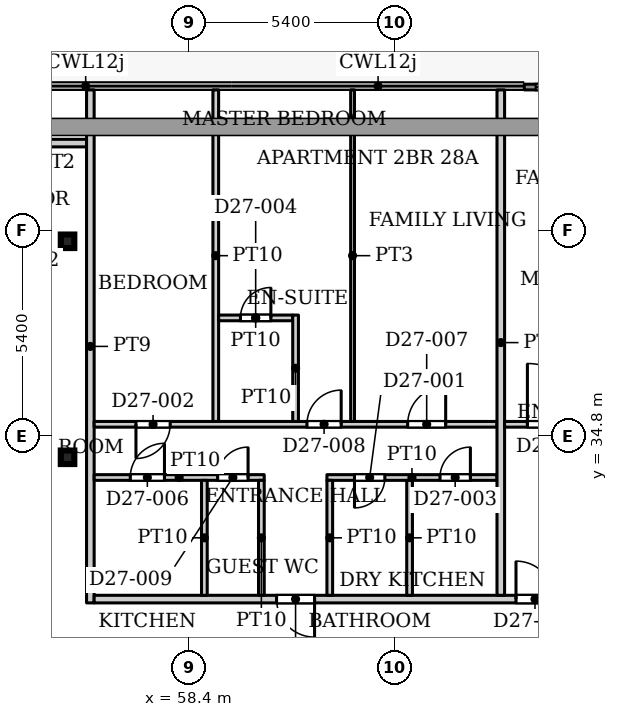
"""IFC4 building model, lengths in metres.
Left out: names, types, materials, properties, quantities, classifications, styles, units other than length and angle.
Written with IfcOpenShell. Run it as: python <this file> out.ifc"""

import sys

from ifc_helpers import new_model, si_unit, direction, frame, frame_2d, origin, origin_2d, place, context, subcontext, project, spatial, rectangle, hollow_rectangle, extrude, source, transform, mapped, element, fill, save


model = new_model("IFC4")
c1 = context("Model", 3, precision=1e-05, world=origin(), true_north=direction((0.0, 1.0)))
c2 = subcontext(c1, "Body", "Model", "MODEL_VIEW")
j1 = project(units=[si_unit("LENGTHUNIT", "METRE"), si_unit("PLANEANGLEUNIT", "RADIAN")], contexts=[c1])
p1 = place(None, origin())
s1 = spatial("IfcSite", under=j1, at=p1, CompositionType="ELEMENT")
p2 = place(p1, origin())
s2 = spatial("IfcBuilding", under=s1, at=p2, CompositionType="ELEMENT")
p3 = place(p2, frame((0.0, 0.0, 121.4)))
s3 = spatial("IfcBuildingStorey", under=s2, at=p3, CompositionType="ELEMENT", Elevation=121.4)
for number, where, z_axis, x_axis in (
    (1, (55.2, 34.232, 0.0), (0.0, 0.0, 1.0), (1.0, 0.0, 0.0)),
    (2, (55.2, 39.916, 0.0), (0.0, 0.0, 1.0), (1.0, 0.0, 0.0)),
):
    element("IfcColumn", number, at=place(p3, frame(where, z_axis=z_axis, x_axis=x_axis)), inside=s3, PredefinedType="COLUMN", context=c2, shape_type="SweptSolid", body=[
        extrude(hollow_rectangle(XDim=0.356, YDim=0.356, WallThickness=0.016, InnerFilletRadius=0.016, OuterFilletRadius=0.032, at=origin_2d()), origin(), (0.0, 0.0, 1.0), 3.9),
    ])
p4 = place(p3, frame((67.218, 43.975, 0.0), z_axis=(0.0, 0.0, 1.0), x_axis=(1.0, 0.0, 0.0)))
e3 = element("IfcWall", 3, at=p4, inside=s3, PredefinedType="SOLIDWALL", context=c2, shape_type="SweptSolid", body=[
    extrude(rectangle(XDim=2.4, YDim=0.15, at=frame_2d((1.2, 0.0))), origin(), (0.0, 0.0, 1.0), 3.75),
])
p5 = place(p4, frame((0.3, 0.0, 0.0)))
e4 = element("IfcOpeningElement", 4, at=p5, cuts=e3, PredefinedType="OPENING", context=c2, shape_type="SweptSolid", body=[
    extrude(rectangle(XDim=1.8, YDim=2.4, at=frame_2d((0.9, 1.2))), frame((0.0, 0.085, 0.0), z_axis=(0.0, -1.0, 0.0), x_axis=(1.0, 0.0, 0.0)), (0.0, 0.0, 1.0), 0.17),
])
p6 = place(p3, frame((53.5, 42.5, 0.0), z_axis=(0.0, 0.0, 1.0), x_axis=(1.0, 0.0, 0.0)))
e5 = element("IfcWall", 5, at=p6, inside=s3, PredefinedType="PARTITIONING", context=c2, shape_type="SweptSolid", body=[
    extrude(rectangle(XDim=2.2, YDim=0.2, at=frame_2d((1.1, 0.0))), origin(), (0.0, 0.0, 1.0), 3.6),
])
p7 = place(p3, frame((55.8, 30.4, 0.0), z_axis=(0.0, 0.0, 1.0), x_axis=(0.0, 1.0, 0.0)))
e6 = element("IfcWall", 6, at=p7, inside=s3, PredefinedType="PARTITIONING", context=c2, shape_type="SweptSolid", body=[
    extrude(rectangle(XDim=13.5, YDim=0.2, at=frame_2d((6.75, 0.0))), origin(), (0.0, 0.0, 1.0), 3.6),
])
p8 = place(p3, frame((55.9, 30.5, 0.0), z_axis=(0.0, 0.0, 1.0), x_axis=(1.0, 0.0, 0.0)))
e7 = element("IfcWall", 7, at=p8, inside=s3, PredefinedType="PARTITIONING", context=c2, shape_type="SweptSolid", body=[
    extrude(rectangle(XDim=42.2, YDim=0.2, at=frame_2d((21.1, 0.0))), origin(), (0.0, 0.0, 1.0), 3.6),
])
p9 = place(p8, frame((4.8, 0.0, 0.0)))
e8 = element("IfcOpeningElement", 8, at=p9, cuts=e7, PredefinedType="OPENING", context=c2, shape_type="SweptSolid", body=[
    extrude(rectangle(XDim=1.0, YDim=2.1, at=frame_2d((0.5, 1.05))), frame((0.0, 0.11, 0.0), z_axis=(0.0, -1.0, 0.0), x_axis=(1.0, 0.0, 0.0)), (0.0, 0.0, 1.0), 0.22),
])
p10 = place(p8, frame((11.1, 0.0, 0.0)))
e9 = element("IfcOpeningElement", 9, at=p10, cuts=e7, PredefinedType="OPENING", context=c2, shape_type="SweptSolid", body=[
    extrude(rectangle(XDim=1.0, YDim=2.1, at=frame_2d((0.5, 1.05))), frame((0.0, 0.11, 0.0), z_axis=(0.0, -1.0, 0.0), x_axis=(1.0, 0.0, 0.0)), (0.0, 0.0, 1.0), 0.22),
])
p11 = place(p8, frame((39.0, 0.0, 0.0)))
e10 = element("IfcOpeningElement", 10, at=p11, cuts=e7, PredefinedType="OPENING", context=c2, shape_type="SweptSolid", body=[
    extrude(rectangle(XDim=1.0, YDim=2.1, at=frame_2d((0.5, 1.05))), frame((0.0, 0.11, 0.0), z_axis=(0.0, -1.0, 0.0), x_axis=(1.0, 0.0, 0.0)), (0.0, 0.0, 1.0), 0.22),
])
p12 = place(p3, frame((55.9, 33.7, 0.0), z_axis=(0.0, 0.0, 1.0), x_axis=(1.0, 0.0, 0.0)))
e11 = element("IfcWall", 11, at=p12, inside=s3, PredefinedType="PARTITIONING", context=c2, shape_type="SweptSolid", body=[
    extrude(rectangle(XDim=4.475, YDim=0.15, at=frame_2d((2.238, 0.0))), origin(), (0.0, 0.0, 1.0), 3.6),
])
p13 = place(p12, frame((0.95, 0.0, 0.0)))
e12 = element("IfcOpeningElement", 12, at=p13, cuts=e11, PredefinedType="OPENING", context=c2, shape_type="SweptSolid", body=[
    extrude(rectangle(XDim=0.9, YDim=2.1, at=frame_2d((0.45, 1.05))), frame((0.0, 0.085, 0.0), z_axis=(0.0, -1.0, 0.0), x_axis=(1.0, 0.0, 0.0)), (0.0, 0.0, 1.0), 0.17),
])
p14 = place(p12, frame((3.25, 0.0, 0.0)))
e13 = element("IfcOpeningElement", 13, at=p14, cuts=e11, PredefinedType="OPENING", context=c2, shape_type="SweptSolid", body=[
    extrude(rectangle(XDim=0.8, YDim=2.1, at=frame_2d((0.4, 1.05))), frame((0.0, 0.085, 0.0), z_axis=(0.0, -1.0, 0.0), x_axis=(1.0, 0.0, 0.0)), (0.0, 0.0, 1.0), 0.17),
])
p15 = place(p3, frame((55.9, 35.1, 0.0), z_axis=(0.0, 0.0, 1.0), x_axis=(1.0, 0.0, 0.0)))
e14 = element("IfcWall", 14, at=p15, inside=s3, PredefinedType="PARTITIONING", context=c2, shape_type="SweptSolid", body=[
    extrude(rectangle(XDim=10.6, YDim=0.15, at=frame_2d((5.3, 0.0))), origin(), (0.0, 0.0, 1.0), 3.6),
])
p16 = place(p15, frame((1.1, 0.0, 0.0)))
e15 = element("IfcOpeningElement", 15, at=p16, cuts=e14, PredefinedType="OPENING", context=c2, shape_type="SweptSolid", body=[
    extrude(rectangle(XDim=0.9, YDim=2.1, at=frame_2d((0.45, 1.05))), frame((0.0, 0.085, 0.0), z_axis=(0.0, -1.0, 0.0), x_axis=(1.0, 0.0, 0.0)), (0.0, 0.0, 1.0), 0.17),
])
p17 = place(p15, frame((8.25, 0.0, 0.0)))
e16 = element("IfcOpeningElement", 16, at=p17, cuts=e14, PredefinedType="OPENING", context=c2, shape_type="SweptSolid", body=[
    extrude(rectangle(XDim=1.0, YDim=2.1, at=frame_2d((0.5, 1.05))), frame((0.0, 0.085, 0.0), z_axis=(0.0, -1.0, 0.0), x_axis=(1.0, 0.0, 0.0)), (0.0, 0.0, 1.0), 0.17),
])
p18 = place(p15, frame((5.6, 0.0, 0.0)))
e17 = element("IfcOpeningElement", 17, at=p18, cuts=e14, PredefinedType="OPENING", context=c2, shape_type="SweptSolid", body=[
    extrude(rectangle(XDim=0.9, YDim=2.1, at=frame_2d((0.45, 1.05))), frame((0.0, 0.085, 0.0), z_axis=(0.0, -1.0, 0.0), x_axis=(1.0, 0.0, 0.0)), (0.0, 0.0, 1.0), 0.17),
])
p19 = place(p3, frame((58.8, 30.6, 0.0), z_axis=(0.0, 0.0, 1.0), x_axis=(0.0, 1.0, 0.0)))
e18 = element("IfcWall", 18, at=p19, inside=s3, PredefinedType="PARTITIONING", context=c2, shape_type="SweptSolid", body=[
    extrude(rectangle(XDim=3.025, YDim=0.15, at=frame_2d((1.512, 0.0))), origin(), (0.0, 0.0, 1.0), 3.6),
])
p20 = place(p3, frame((59.1, 35.175, 0.0), z_axis=(0.0, 0.0, 1.0), x_axis=(0.0, 1.0, 0.0)))
e19 = element("IfcWall", 19, at=p20, inside=s3, PredefinedType="PARTITIONING", context=c2, shape_type="SweptSolid", body=[
    extrude(rectangle(XDim=8.725, YDim=0.15, at=frame_2d((4.362, 0.0))), origin(), (0.0, 0.0, 1.0), 3.6),
])
p21 = place(p3, frame((59.175, 37.9, 0.0), z_axis=(0.0, 0.0, 1.0), x_axis=(1.0, 0.0, 0.0)))
e20 = element("IfcWall", 20, at=p21, inside=s3, PredefinedType="PARTITIONING", context=c2, shape_type="SweptSolid", body=[
    extrude(rectangle(XDim=1.95, YDim=0.15, at=frame_2d((0.975, 0.0))), origin(), (0.0, 0.0, 1.0), 3.6),
])
p22 = place(p21, frame((0.575, 0.0, 0.0)))
e21 = element("IfcOpeningElement", 21, at=p22, cuts=e20, PredefinedType="OPENING", context=c2, shape_type="SweptSolid", body=[
    extrude(rectangle(XDim=0.8, YDim=2.1, at=frame_2d((0.4, 1.05))), frame((0.0, 0.085, 0.0), z_axis=(0.0, -1.0, 0.0), x_axis=(1.0, 0.0, 0.0)), (0.0, 0.0, 1.0), 0.17),
])
p23 = place(p3, frame((60.3, 30.6, 0.0), z_axis=(0.0, 0.0, 1.0), x_axis=(0.0, 1.0, 0.0)))
e22 = element("IfcWall", 22, at=p23, inside=s3, PredefinedType="PARTITIONING", context=c2, shape_type="SweptSolid", body=[
    extrude(rectangle(XDim=3.025, YDim=0.15, at=frame_2d((1.512, 0.0))), origin(), (0.0, 0.0, 1.0), 3.6),
])
p24 = place(p3, frame((61.2, 35.175, 0.0), z_axis=(0.0, 0.0, 1.0), x_axis=(0.0, 1.0, 0.0)))
e23 = element("IfcWall", 23, at=p24, inside=s3, PredefinedType="PARTITIONING", context=c2, shape_type="SweptSolid", body=[
    extrude(rectangle(XDim=2.8, YDim=0.15, at=frame_2d((1.4, 0.0))), origin(), (0.0, 0.0, 1.0), 3.6),
])
p25 = place(p3, frame((62.025, 33.7, 0.0), z_axis=(0.0, 0.0, 1.0), x_axis=(1.0, 0.0, 0.0)))
e24 = element("IfcWall", 24, at=p25, inside=s3, PredefinedType="PARTITIONING", context=c2, shape_type="SweptSolid", body=[
    extrude(rectangle(XDim=4.475, YDim=0.15, at=frame_2d((2.238, 0.0))), origin(), (0.0, 0.0, 1.0), 3.6),
])
p26 = place(p25, frame((0.725, 0.0, 0.0)))
e25 = element("IfcOpeningElement", 25, at=p26, cuts=e24, PredefinedType="OPENING", context=c2, shape_type="SweptSolid", body=[
    extrude(rectangle(XDim=0.8, YDim=2.1, at=frame_2d((0.4, 1.05))), frame((0.0, 0.085, 0.0), z_axis=(0.0, -1.0, 0.0), x_axis=(1.0, 0.0, 0.0)), (0.0, 0.0, 1.0), 0.17),
])
p27 = place(p25, frame((2.975, 0.0, 0.0)))
e26 = element("IfcOpeningElement", 26, at=p27, cuts=e24, PredefinedType="OPENING", context=c2, shape_type="SweptSolid", body=[
    extrude(rectangle(XDim=0.8, YDim=2.1, at=frame_2d((0.4, 1.05))), frame((0.0, 0.085, 0.0), z_axis=(0.0, -1.0, 0.0), x_axis=(1.0, 0.0, 0.0)), (0.0, 0.0, 1.0), 0.17),
])
p28 = place(p3, frame((62.1, 30.6, 0.0), z_axis=(0.0, 0.0, 1.0), x_axis=(0.0, 1.0, 0.0)))
e27 = element("IfcWall", 27, at=p28, inside=s3, PredefinedType="PARTITIONING", context=c2, shape_type="SweptSolid", body=[
    extrude(rectangle(XDim=3.025, YDim=0.15, at=frame_2d((1.512, 0.0))), origin(), (0.0, 0.0, 1.0), 3.6),
])
p29 = place(p3, frame((62.7, 35.175, 0.0), z_axis=(0.0, 0.0, 1.0), x_axis=(0.0, 1.0, 0.0)))
e28 = element("IfcWall", 28, at=p29, inside=s3, PredefinedType="PARTITIONING", context=c2, shape_type="SweptSolid", body=[
    extrude(rectangle(XDim=8.725, YDim=0.1, at=frame_2d((4.362, 0.0))), origin(), (0.0, 0.0, 1.0), 3.6),
])
p30 = place(p3, frame((64.2, 30.6, 0.0), z_axis=(0.0, 0.0, 1.0), x_axis=(0.0, 1.0, 0.0)))
e29 = element("IfcWall", 29, at=p30, inside=s3, PredefinedType="PARTITIONING", context=c2, shape_type="SweptSolid", body=[
    extrude(rectangle(XDim=3.025, YDim=0.15, at=frame_2d((1.512, 0.0))), origin(), (0.0, 0.0, 1.0), 3.6),
])
p31 = place(p3, frame((66.6, 30.6, 0.0), z_axis=(0.0, 0.0, 1.0), x_axis=(0.0, 1.0, 0.0)))
e30 = element("IfcWall", 30, at=p31, inside=s3, PredefinedType="PARTITIONING", context=c2, shape_type="SweptSolid", body=[
    extrude(rectangle(XDim=13.3, YDim=0.2, at=frame_2d((6.65, 0.0))), origin(), (0.0, 0.0, 1.0), 3.6),
])
p32 = place(p3, frame((66.7, 35.1, 0.0), z_axis=(0.0, 0.0, 1.0), x_axis=(1.0, 0.0, 0.0)))
e31 = element("IfcWall", 31, at=p32, inside=s3, PredefinedType="PARTITIONING", context=c2, shape_type="SweptSolid", body=[
    extrude(rectangle(XDim=14.8, YDim=0.15, at=frame_2d((7.4, 0.0))), origin(), (0.0, 0.0, 1.0), 3.6),
])
p33 = place(p32, frame((10.25, 0.0, 0.0)))
e32 = element("IfcOpeningElement", 32, at=p33, cuts=e31, PredefinedType="OPENING", context=c2, shape_type="SweptSolid", body=[
    extrude(rectangle(XDim=0.9, YDim=2.1, at=frame_2d((0.45, 1.05))), frame((0.0, 0.085, 0.0), z_axis=(0.0, -1.0, 0.0), x_axis=(1.0, 0.0, 0.0)), (0.0, 0.0, 1.0), 0.17),
])
p34 = place(p32, frame((12.95, 0.0, 0.0)))
e33 = element("IfcOpeningElement", 33, at=p34, cuts=e31, PredefinedType="OPENING", context=c2, shape_type="SweptSolid", body=[
    extrude(rectangle(XDim=0.9, YDim=2.1, at=frame_2d((0.45, 1.05))), frame((0.0, 0.085, 0.0), z_axis=(0.0, -1.0, 0.0), x_axis=(1.0, 0.0, 0.0)), (0.0, 0.0, 1.0), 0.17),
])
p35 = place(p32, frame((3.9, 0.0, 0.0)))
e34 = element("IfcOpeningElement", 34, at=p35, cuts=e31, PredefinedType="OPENING", context=c2, shape_type="SweptSolid", body=[
    extrude(rectangle(XDim=1.0, YDim=2.1, at=frame_2d((0.5, 1.05))), frame((0.0, 0.085, 0.0), z_axis=(0.0, -1.0, 0.0), x_axis=(1.0, 0.0, 0.0)), (0.0, 0.0, 1.0), 0.17),
])
p36 = place(p32, frame((0.6, 0.0, 0.0)))
e35 = element("IfcOpeningElement", 35, at=p36, cuts=e31, PredefinedType="OPENING", context=c2, shape_type="SweptSolid", body=[
    extrude(rectangle(XDim=1.6, YDim=2.1, at=frame_2d((0.8, 1.05))), frame((0.0, 0.085, 0.0), z_axis=(0.0, -1.0, 0.0), x_axis=(1.0, 0.0, 0.0)), (0.0, 0.0, 1.0), 0.17),
])
p37 = place(p32, frame((8.3, 0.0, 0.0)))
e36 = element("IfcOpeningElement", 36, at=p37, cuts=e31, PredefinedType="OPENING", context=c2, shape_type="SweptSolid", body=[
    extrude(rectangle(XDim=0.9, YDim=2.1, at=frame_2d((0.45, 1.05))), frame((0.0, 0.085, 0.0), z_axis=(0.0, -1.0, 0.0), x_axis=(1.0, 0.0, 0.0)), (0.0, 0.0, 1.0), 0.17),
])
m1 = source(origin(), c2, "Body", "SweptSolid", [
    extrude(rectangle(XDim=1.8, YDim=2.4, at=frame_2d((0.9, 1.2))), frame((0.0, 0.025, 0.0), z_axis=(0.0, -1.0, 0.0), x_axis=(1.0, 0.0, 0.0)), (0.0, 0.0, 1.0), 0.05),
])
p38 = place(p5, origin())
e37 = element("IfcDoor", 37, at=p38, inside=s3, OperationType="SLIDING_TO_LEFT", PredefinedType="DOOR", context=c2, shape_type="MappedRepresentation", body=[
    mapped(m1, transform((0.0, 0.0, 0.0), x_axis=(1.0, 0.0, 0.0), y_axis=(0.0, 1.0, 0.0), z_axis=(0.0, 0.0, 1.0), scale=1.0)),
])
fill(e4, e37)
m2 = source(origin(), c2, "Body", "SweptSolid", [
    extrude(rectangle(XDim=0.8, YDim=2.1, at=frame_2d((0.4, 1.05))), frame((0.0, 0.025, 0.0), z_axis=(0.0, -1.0, 0.0), x_axis=(1.0, 0.0, 0.0)), (0.0, 0.0, 1.0), 0.05),
])
p39 = place(p26, origin())
e38 = element("IfcDoor", 38, at=p39, inside=s3, OperationType="SINGLE_SWING_RIGHT", PredefinedType="DOOR", context=c2, shape_type="MappedRepresentation", body=[
    mapped(m2, transform((0.0, 0.0, 0.0), x_axis=(1.0, 0.0, 0.0), y_axis=(0.0, 1.0, 0.0), z_axis=(0.0, 0.0, 1.0), scale=1.0)),
])
fill(e25, e38)
m3 = source(origin(), c2, "Body", "SweptSolid", [
    extrude(rectangle(XDim=0.9, YDim=2.1, at=frame_2d((0.45, 1.05))), frame((0.0, 0.025, 0.0), z_axis=(0.0, -1.0, 0.0), x_axis=(1.0, 0.0, 0.0)), (0.0, 0.0, 1.0), 0.05),
])
p40 = place(p16, origin())
e39 = element("IfcDoor", 39, at=p40, inside=s3, OperationType="SINGLE_SWING_RIGHT", PredefinedType="DOOR", context=c2, shape_type="MappedRepresentation", body=[
    mapped(m3, transform((0.0, 0.0, 0.0), x_axis=(1.0, 0.0, 0.0), y_axis=(0.0, 1.0, 0.0), z_axis=(0.0, 0.0, 1.0), scale=1.0)),
])
fill(e15, e39)
p41 = place(p27, origin())
e40 = element("IfcDoor", 40, at=p41, inside=s3, OperationType="SINGLE_SWING_LEFT", PredefinedType="DOOR", context=c2, shape_type="MappedRepresentation", body=[
    mapped(m2, transform((0.0, 0.0, 0.0), x_axis=(1.0, 0.0, 0.0), y_axis=(0.0, 1.0, 0.0), z_axis=(0.0, 0.0, 1.0), scale=1.0)),
])
fill(e26, e40)
p42 = place(p22, origin())
e41 = element("IfcDoor", 41, at=p42, inside=s3, OperationType="SINGLE_SWING_LEFT", PredefinedType="DOOR", context=c2, shape_type="MappedRepresentation", body=[
    mapped(m2, transform((0.0, 0.0, 0.0), x_axis=(1.0, 0.0, 0.0), y_axis=(0.0, 1.0, 0.0), z_axis=(0.0, 0.0, 1.0), scale=1.0)),
])
fill(e21, e41)
m4 = source(origin(), c2, "Body", "SweptSolid", [
    extrude(rectangle(XDim=1.0, YDim=2.1, at=frame_2d((0.5, 1.05))), frame((0.0, 0.025, 0.0), z_axis=(0.0, -1.0, 0.0), x_axis=(1.0, 0.0, 0.0)), (0.0, 0.0, 1.0), 0.05),
])
p43 = place(p9, origin())
e42 = element("IfcDoor", 42, at=p43, inside=s3, OperationType="SINGLE_SWING_RIGHT", PredefinedType="DOOR", context=c2, shape_type="MappedRepresentation", body=[
    mapped(m4, transform((0.0, 0.0, 0.0), x_axis=(1.0, 0.0, 0.0), y_axis=(0.0, 1.0, 0.0), z_axis=(0.0, 0.0, 1.0), scale=1.0)),
])
fill(e8, e42)
p44 = place(p13, origin())
e43 = element("IfcDoor", 43, at=p44, inside=s3, OperationType="SINGLE_SWING_LEFT", PredefinedType="DOOR", context=c2, shape_type="MappedRepresentation", body=[
    mapped(m3, transform((0.0, 0.0, 0.0), x_axis=(1.0, 0.0, 0.0), y_axis=(0.0, 1.0, 0.0), z_axis=(0.0, 0.0, 1.0), scale=1.0)),
])
fill(e12, e43)
m5 = source(origin(), c2, "Body", "SweptSolid", [
    extrude(rectangle(XDim=1.0, YDim=2.1, at=frame_2d((0.5, 1.05))), frame((0.0, 0.025, 0.0), z_axis=(0.0, -1.0, 0.0), x_axis=(1.0, 0.0, 0.0)), (0.0, 0.0, 1.0), 0.05),
])
p45 = place(p17, origin())
e44 = element("IfcDoor", 44, at=p45, inside=s3, OperationType="SINGLE_SWING_LEFT", PredefinedType="DOOR", context=c2, shape_type="MappedRepresentation", body=[
    mapped(m5, transform((0.0, 0.0, 0.0), x_axis=(1.0, 0.0, 0.0), y_axis=(0.0, 1.0, 0.0), z_axis=(0.0, 0.0, 1.0), scale=1.0)),
])
fill(e16, e44)
p46 = place(p18, origin())
e45 = element("IfcDoor", 45, at=p46, inside=s3, OperationType="SINGLE_SWING_LEFT", PredefinedType="DOOR", context=c2, shape_type="MappedRepresentation", body=[
    mapped(m3, transform((0.0, 0.0, 0.0), x_axis=(1.0, 0.0, 0.0), y_axis=(0.0, 1.0, 0.0), z_axis=(0.0, 0.0, 1.0), scale=1.0)),
])
fill(e17, e45)
p47 = place(p14, origin())
e46 = element("IfcDoor", 46, at=p47, inside=s3, OperationType="SINGLE_SWING_LEFT", PredefinedType="DOOR", context=c2, shape_type="MappedRepresentation", body=[
    mapped(m2, transform((0.0, 0.0, 0.0), x_axis=(1.0, 0.0, 0.0), y_axis=(0.0, 1.0, 0.0), z_axis=(0.0, 0.0, 1.0), scale=1.0)),
])
fill(e13, e46)
p48 = place(p10, origin())
e47 = element("IfcDoor", 47, at=p48, inside=s3, OperationType="SINGLE_SWING_LEFT", PredefinedType="DOOR", context=c2, shape_type="MappedRepresentation", body=[
    mapped(m4, transform((0.0, 0.0, 0.0), x_axis=(1.0, 0.0, 0.0), y_axis=(0.0, 1.0, 0.0), z_axis=(0.0, 0.0, 1.0), scale=1.0)),
])
fill(e9, e47)
m6 = source(origin(), c2, "Body", "SweptSolid", [
    extrude(rectangle(XDim=1.6, YDim=2.1, at=frame_2d((0.8, 1.05))), frame((0.0, 0.025, 0.0), z_axis=(0.0, -1.0, 0.0), x_axis=(1.0, 0.0, 0.0)), (0.0, 0.0, 1.0), 0.05),
])
p49 = place(p36, origin())
e48 = element("IfcDoor", 48, at=p49, inside=s3, OperationType="DOUBLE_DOOR_SINGLE_SWING", PredefinedType="DOOR", context=c2, shape_type="MappedRepresentation", body=[
    mapped(m6, transform((0.0, 0.0, 0.0), x_axis=(1.0, 0.0, 0.0), y_axis=(0.0, 1.0, 0.0), z_axis=(0.0, 0.0, 1.0), scale=1.0)),
])
fill(e35, e48)
save(model, sys.argv[1])
